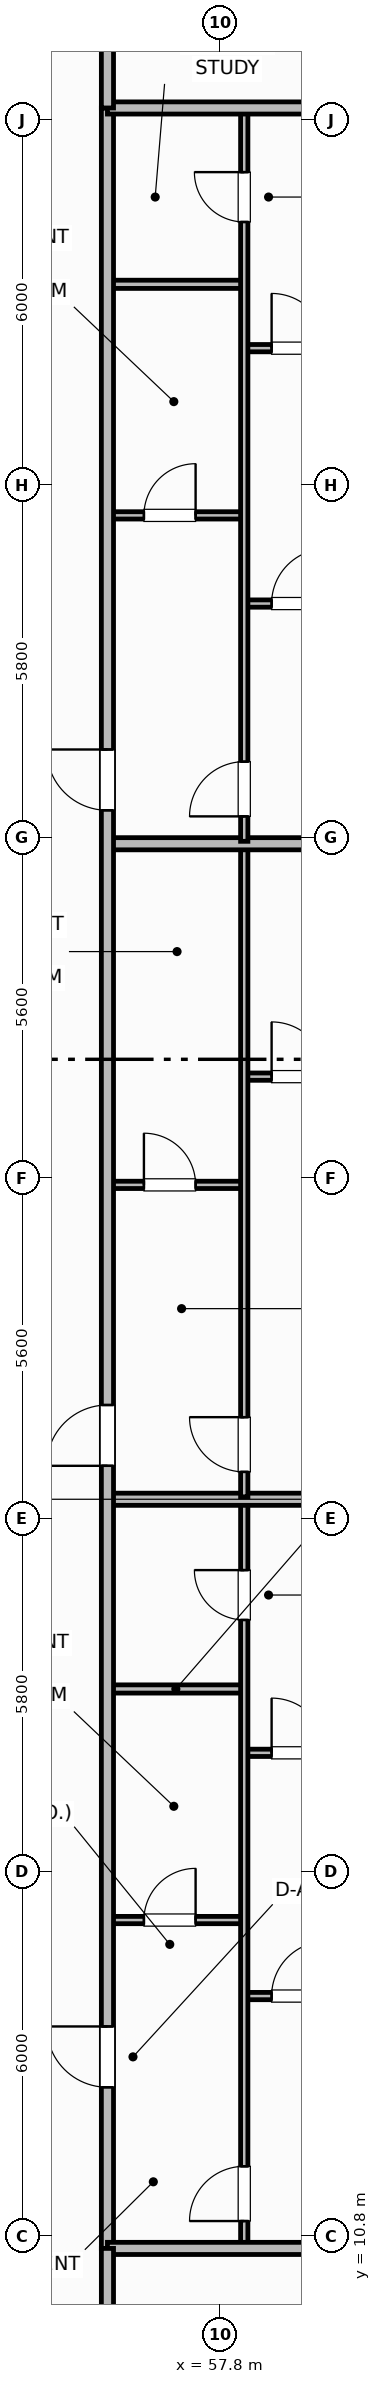
"""IFC4 building model, lengths in metres.
Left out: names, types, materials, properties, quantities, classifications, styles, units other than length and angle.
Written with IfcOpenShell. Run it as: python <this file> out.ifc"""

import sys

from ifc_helpers import new_model, si_unit, direction, frame, frame_2d, origin, place, context, subcontext, project, spatial, rectangle, extrude, element, fill, save


model = new_model("IFC4")
c1 = context("Model", 3, precision=1e-05, world=origin(), true_north=direction((0.0, 1.0)))
c2 = subcontext(c1, "Body", "Model", "MODEL_VIEW")
j1 = project(units=[si_unit("LENGTHUNIT", "METRE"), si_unit("PLANEANGLEUNIT", "RADIAN")], contexts=[c1])
p1 = place(None, origin())
s1 = spatial("IfcSite", under=j1, at=p1, CompositionType="ELEMENT")
p2 = place(p1, origin())
s2 = spatial("IfcBuilding", under=s1, at=p2, CompositionType="ELEMENT")
p3 = place(p2, frame((0.0, 0.0, 69.5)))
s3 = spatial("IfcBuildingStorey", under=s2, at=p3, CompositionType="ELEMENT", Elevation=69.5)
p4 = place(p3, frame((55.95, 16.0, 0.0), z_axis=(0.0, 0.0, 1.0), x_axis=(1.0, 0.0, 0.0)))
e1 = element("IfcWall", 1, at=p4, inside=s3, PredefinedType="PARTITIONING", context=c2, shape_type="SweptSolid", body=[
    extrude(rectangle(XDim=2.25, YDim=0.12, at=frame_2d((1.125, 0.0))), origin(), (0.0, 0.0, 1.0), 2.53),
])
p5 = place(p4, frame((0.6, 0.0, 0.0)))
e2 = element("IfcOpeningElement", 2, at=p5, cuts=e1, PredefinedType="OPENING", context=c2, shape_type="SweptSolid", body=[
    extrude(rectangle(XDim=0.85, YDim=2.1, at=frame_2d((0.425, 1.05))), frame((0.0, 0.07, 0.0), z_axis=(0.0, -1.0, 0.0), x_axis=(1.0, 0.0, 0.0)), (0.0, 0.0, 1.0), 0.14),
])
p6 = place(p3, frame((55.95, 19.8, 0.0), z_axis=(0.0, 0.0, 1.0), x_axis=(1.0, 0.0, 0.0)))
e3 = element("IfcWall", 3, at=p6, inside=s3, PredefinedType="PARTITIONING", context=c2, shape_type="SweptSolid", body=[
    extrude(rectangle(XDim=2.25, YDim=0.135, at=frame_2d((1.125, 0.0))), origin(), (0.0, 0.0, 1.0), 2.53),
])
p7 = place(p3, frame((58.2, 14.75, 0.0), z_axis=(0.0, 0.0, 1.0), x_axis=(1.0, 0.0, 0.0)))
e4 = element("IfcWall", 4, at=p7, inside=s3, PredefinedType="PARTITIONING", context=c2, shape_type="SweptSolid", body=[
    extrude(rectangle(XDim=5.63, YDim=0.12, at=frame_2d((2.815, 0.0))), origin(), (0.0, 0.0, 1.0), 2.53),
])
p8 = place(p7, frame((0.45, 0.0, 0.0)))
e5 = element("IfcOpeningElement", 5, at=p8, cuts=e4, PredefinedType="OPENING", context=c2, shape_type="SweptSolid", body=[
    extrude(rectangle(XDim=0.9, YDim=2.1, at=frame_2d((0.45, 1.05))), frame((0.0, 0.07, 0.0), z_axis=(0.0, -1.0, 0.0), x_axis=(1.0, 0.0, 0.0)), (0.0, 0.0, 1.0), 0.14),
])
p9 = place(p3, frame((58.2, 18.75, 0.0), z_axis=(0.0, 0.0, 1.0), x_axis=(1.0, 0.0, 0.0)))
e6 = element("IfcWall", 6, at=p9, inside=s3, PredefinedType="PARTITIONING", context=c2, shape_type="SweptSolid", body=[
    extrude(rectangle(XDim=5.63, YDim=0.12, at=frame_2d((2.815, 0.0))), origin(), (0.0, 0.0, 1.0), 2.53),
])
p10 = place(p9, frame((0.45, 0.0, 0.0)))
e7 = element("IfcOpeningElement", 7, at=p10, cuts=e6, PredefinedType="OPENING", context=c2, shape_type="SweptSolid", body=[
    extrude(rectangle(XDim=0.9, YDim=2.1, at=frame_2d((0.45, 1.05))), frame((0.0, 0.07, 0.0), z_axis=(0.0, -1.0, 0.0), x_axis=(1.0, 0.0, 0.0)), (0.0, 0.0, 1.0), 0.14),
])
p11 = place(p3, frame((58.2, 10.64, 0.0), z_axis=(0.0, 0.0, 1.0), x_axis=(0.0, 1.0, 0.0)))
e8 = element("IfcWall", 8, at=p11, inside=s3, PredefinedType="PARTITIONING", context=c2, shape_type="SweptSolid", body=[
    extrude(rectangle(XDim=12.24, YDim=0.12, at=frame_2d((6.12, 0.0))), origin(), (0.0, 0.0, 1.0), 2.53),
])
p12 = place(p11, frame((0.41, 0.0, 0.0)))
e9 = element("IfcOpeningElement", 9, at=p12, cuts=e8, PredefinedType="OPENING", context=c2, shape_type="SweptSolid", body=[
    extrude(rectangle(XDim=0.9, YDim=2.1, at=frame_2d((0.45, 1.05))), frame((0.0, 0.07, 0.0), z_axis=(0.0, -1.0, 0.0), x_axis=(1.0, 0.0, 0.0)), (0.0, 0.0, 1.0), 0.14),
])
p13 = place(p11, frame((10.295, 0.0, 0.0)))
e10 = element("IfcOpeningElement", 10, at=p13, cuts=e8, PredefinedType="OPENING", context=c2, shape_type="SweptSolid", body=[
    extrude(rectangle(XDim=0.82, YDim=2.08, at=frame_2d((0.41, 1.04))), frame((0.0, 0.07, 0.0), z_axis=(0.0, -1.0, 0.0), x_axis=(1.0, 0.0, 0.0)), (0.0, 0.0, 1.0), 0.14),
])
p14 = place(p3, frame((55.95, 22.92, 0.0), z_axis=(0.0, 0.0, 1.0), x_axis=(1.0, 0.0, 0.0)))
e11 = element("IfcWall", 11, at=p14, inside=s3, PredefinedType="PARTITIONING", context=c2, shape_type="SweptSolid", body=[
    extrude(rectangle(XDim=7.88, YDim=0.2, at=frame_2d((3.94, 0.0))), origin(), (0.0, 0.0, 1.0), 2.53),
])
p15 = place(p3, frame((55.95, 28.09, 0.0), z_axis=(0.0, 0.0, 1.0), x_axis=(1.0, 0.0, 0.0)))
e12 = element("IfcWall", 12, at=p15, inside=s3, PredefinedType="PARTITIONING", context=c2, shape_type="SweptSolid", body=[
    extrude(rectangle(XDim=2.25, YDim=0.12, at=frame_2d((1.125, 0.0))), origin(), (0.0, 0.0, 1.0), 2.53),
])
p16 = place(p15, frame((0.6, 0.0, 0.0)))
e13 = element("IfcOpeningElement", 13, at=p16, cuts=e12, PredefinedType="OPENING", context=c2, shape_type="SweptSolid", body=[
    extrude(rectangle(XDim=0.85, YDim=2.1, at=frame_2d((0.425, 1.05))), frame((0.0, 0.07, 0.0), z_axis=(0.0, -1.0, 0.0), x_axis=(1.0, 0.0, 0.0)), (0.0, 0.0, 1.0), 0.14),
])
p17 = place(p3, frame((58.2, 29.87, 0.0), z_axis=(0.0, 0.0, 1.0), x_axis=(1.0, 0.0, 0.0)))
e14 = element("IfcWall", 14, at=p17, inside=s3, PredefinedType="PARTITIONING", context=c2, shape_type="SweptSolid", body=[
    extrude(rectangle(XDim=4.947, YDim=0.12, at=frame_2d((2.473, 0.0))), origin(), (0.0, 0.0, 1.0), 2.53),
])
p18 = place(p17, frame((0.45, 0.0, 0.0)))
e15 = element("IfcOpeningElement", 15, at=p18, cuts=e14, PredefinedType="OPENING", context=c2, shape_type="SweptSolid", body=[
    extrude(rectangle(XDim=0.9, YDim=2.1, at=frame_2d((0.45, 1.05))), frame((0.0, 0.07, 0.0), z_axis=(0.0, -1.0, 0.0), x_axis=(1.0, 0.0, 0.0)), (0.0, 0.0, 1.0), 0.14),
])
p19 = place(p3, frame((58.2, 22.96, 0.0), z_axis=(0.0, 0.0, 1.0), x_axis=(0.0, 1.0, 0.0)))
e16 = element("IfcWall", 16, at=p19, inside=s3, PredefinedType="PARTITIONING", context=c2, shape_type="SweptSolid", body=[
    extrude(rectangle(XDim=10.7, YDim=0.12, at=frame_2d((5.35, 0.0))), origin(), (0.0, 0.0, 1.0), 2.53),
])
p20 = place(p19, frame((0.41, 0.0, 0.0)))
e17 = element("IfcOpeningElement", 17, at=p20, cuts=e16, PredefinedType="OPENING", context=c2, shape_type="SweptSolid", body=[
    extrude(rectangle(XDim=0.9, YDim=2.1, at=frame_2d((0.45, 1.05))), frame((0.0, 0.07, 0.0), z_axis=(0.0, -1.0, 0.0), x_axis=(1.0, 0.0, 0.0)), (0.0, 0.0, 1.0), 0.14),
])
p21 = place(p3, frame((55.95, 33.7, 0.0), z_axis=(0.0, 0.0, 1.0), x_axis=(1.0, 0.0, 0.0)))
e18 = element("IfcWall", 18, at=p21, inside=s3, PredefinedType="PARTITIONING", context=c2, shape_type="SweptSolid", body=[
    extrude(rectangle(XDim=7.88, YDim=0.2, at=frame_2d((3.94, 0.0))), origin(), (0.0, 0.0, 1.0), 2.53),
])
p22 = place(p3, frame((55.95, 39.1, 0.0), z_axis=(0.0, 0.0, 1.0), x_axis=(1.0, 0.0, 0.0)))
e19 = element("IfcWall", 19, at=p22, inside=s3, PredefinedType="PARTITIONING", context=c2, shape_type="SweptSolid", body=[
    extrude(rectangle(XDim=2.25, YDim=0.12, at=frame_2d((1.125, 0.0))), origin(), (0.0, 0.0, 1.0), 2.53),
])
p23 = place(p22, frame((0.6, 0.0, 0.0)))
e20 = element("IfcOpeningElement", 20, at=p23, cuts=e19, PredefinedType="OPENING", context=c2, shape_type="SweptSolid", body=[
    extrude(rectangle(XDim=0.85, YDim=2.1, at=frame_2d((0.425, 1.05))), frame((0.0, 0.07, 0.0), z_axis=(0.0, -1.0, 0.0), x_axis=(1.0, 0.0, 0.0)), (0.0, 0.0, 1.0), 0.14),
])
p24 = place(p3, frame((55.95, 42.9, 0.0), z_axis=(0.0, 0.0, 1.0), x_axis=(1.0, 0.0, 0.0)))
e21 = element("IfcWall", 21, at=p24, inside=s3, PredefinedType="PARTITIONING", context=c2, shape_type="SweptSolid", body=[
    extrude(rectangle(XDim=2.25, YDim=0.135, at=frame_2d((1.125, 0.0))), origin(), (0.0, 0.0, 1.0), 2.53),
])
p25 = place(p3, frame((58.2, 37.65, 0.0), z_axis=(0.0, 0.0, 1.0), x_axis=(1.0, 0.0, 0.0)))
e22 = element("IfcWall", 22, at=p25, inside=s3, PredefinedType="PARTITIONING", context=c2, shape_type="SweptSolid", body=[
    extrude(rectangle(XDim=5.63, YDim=0.12, at=frame_2d((2.815, 0.0))), origin(), (0.0, 0.0, 1.0), 2.53),
])
p26 = place(p25, frame((0.45, 0.0, 0.0)))
e23 = element("IfcOpeningElement", 23, at=p26, cuts=e22, PredefinedType="OPENING", context=c2, shape_type="SweptSolid", body=[
    extrude(rectangle(XDim=0.9, YDim=2.1, at=frame_2d((0.45, 1.05))), frame((0.0, 0.07, 0.0), z_axis=(0.0, -1.0, 0.0), x_axis=(1.0, 0.0, 0.0)), (0.0, 0.0, 1.0), 0.14),
])
p27 = place(p3, frame((58.2, 41.85, 0.0), z_axis=(0.0, 0.0, 1.0), x_axis=(1.0, 0.0, 0.0)))
e24 = element("IfcWall", 24, at=p27, inside=s3, PredefinedType="PARTITIONING", context=c2, shape_type="SweptSolid", body=[
    extrude(rectangle(XDim=5.63, YDim=0.12, at=frame_2d((2.815, 0.0))), origin(), (0.0, 0.0, 1.0), 2.53),
])
p28 = place(p27, frame((0.45, 0.0, 0.0)))
e25 = element("IfcOpeningElement", 25, at=p28, cuts=e24, PredefinedType="OPENING", context=c2, shape_type="SweptSolid", body=[
    extrude(rectangle(XDim=0.9, YDim=2.1, at=frame_2d((0.45, 1.05))), frame((0.0, 0.07, 0.0), z_axis=(0.0, -1.0, 0.0), x_axis=(1.0, 0.0, 0.0)), (0.0, 0.0, 1.0), 0.14),
])
p29 = place(p3, frame((58.2, 33.74, 0.0), z_axis=(0.0, 0.0, 1.0), x_axis=(0.0, 1.0, 0.0)))
e26 = element("IfcWall", 26, at=p29, inside=s3, PredefinedType="PARTITIONING", context=c2, shape_type="SweptSolid", body=[
    extrude(rectangle(XDim=12.02, YDim=0.12, at=frame_2d((6.01, 0.0))), origin(), (0.0, 0.0, 1.0), 2.53),
])
p30 = place(p29, frame((0.41, 0.0, 0.0)))
e27 = element("IfcOpeningElement", 27, at=p30, cuts=e26, PredefinedType="OPENING", context=c2, shape_type="SweptSolid", body=[
    extrude(rectangle(XDim=0.9, YDim=2.1, at=frame_2d((0.45, 1.05))), frame((0.0, 0.07, 0.0), z_axis=(0.0, -1.0, 0.0), x_axis=(1.0, 0.0, 0.0)), (0.0, 0.0, 1.0), 0.14),
])
p31 = place(p29, frame((10.185, 0.0, 0.0)))
e28 = element("IfcOpeningElement", 28, at=p31, cuts=e26, PredefinedType="OPENING", context=c2, shape_type="SweptSolid", body=[
    extrude(rectangle(XDim=0.82, YDim=2.08, at=frame_2d((0.41, 1.04))), frame((0.0, 0.07, 0.0), z_axis=(0.0, -1.0, 0.0), x_axis=(1.0, 0.0, 0.0)), (0.0, 0.0, 1.0), 0.14),
])
p32 = place(p3, frame((55.95, 10.6, 0.0), z_axis=(0.0, 0.0, 1.0), x_axis=(0.0, 1.0, 0.0)))
e29 = element("IfcWall", 29, at=p32, inside=s3, PredefinedType="PARTITIONING", context=c2, shape_type="SweptSolid", body=[
    extrude(rectangle(XDim=35.2, YDim=0.2, at=frame_2d((17.6, 0.0))), origin(), (0.0, 0.0, 1.0), 2.53),
])
p33 = place(p32, frame((2.65, 0.0, 0.0)))
e30 = element("IfcOpeningElement", 30, at=p33, cuts=e29, PredefinedType="OPENING", context=c2, shape_type="SweptSolid", body=[
    extrude(rectangle(XDim=1.0, YDim=2.15, at=frame_2d((0.5, 1.075))), frame((0.0, 0.11, 0.0), z_axis=(0.0, -1.0, 0.0), x_axis=(1.0, 0.0, 0.0)), (0.0, 0.0, 1.0), 0.22),
])
p34 = place(p32, frame((12.87, 0.0, 0.0)))
e31 = element("IfcOpeningElement", 31, at=p34, cuts=e29, PredefinedType="OPENING", context=c2, shape_type="SweptSolid", body=[
    extrude(rectangle(XDim=1.0, YDim=2.15, at=frame_2d((0.5, 1.075))), frame((0.0, 0.11, 0.0), z_axis=(0.0, -1.0, 0.0), x_axis=(1.0, 0.0, 0.0)), (0.0, 0.0, 1.0), 0.22),
])
p35 = place(p32, frame((23.65, 0.0, 0.0)))
e32 = element("IfcOpeningElement", 32, at=p35, cuts=e29, PredefinedType="OPENING", context=c2, shape_type="SweptSolid", body=[
    extrude(rectangle(XDim=1.0, YDim=2.15, at=frame_2d((0.5, 1.075))), frame((0.0, 0.11, 0.0), z_axis=(0.0, -1.0, 0.0), x_axis=(1.0, 0.0, 0.0)), (0.0, 0.0, 1.0), 0.22),
])
for number, where, z_axis, x_axis in (
    (33, (55.95, 10.6, 0.0), (0.0, 0.0, 1.0), (1.0, 0.0, 0.0)),
    (34, (55.95, 45.8, 0.0), (0.0, 0.0, 1.0), (1.0, 0.0, 0.0)),
):
    element("IfcWall", number, at=place(p3, frame(where, z_axis=z_axis, x_axis=x_axis)), inside=s3, PredefinedType="PARTITIONING", context=c2, shape_type="SweptSolid", body=[
        extrude(rectangle(XDim=7.46, YDim=0.2, at=frame_2d((3.73, 0.0))), origin(), (0.0, 0.0, 1.0), 2.53),
    ])
p36 = place(p3, frame((55.95, 4.97, 0.0), z_axis=(0.0, 0.0, 1.0), x_axis=(0.0, 1.0, 0.0)))
e35 = element("IfcWall", 35, at=p36, inside=s3, PredefinedType="PARTITIONING", context=c2, shape_type="SweptSolid", body=[
    extrude(rectangle(XDim=5.63, YDim=0.2, at=frame_2d((2.815, 0.0))), origin(), (0.0, 0.0, 1.0), 2.53),
])
p37 = place(p3, frame((55.95, 45.8, 0.0), z_axis=(0.0, 0.0, 1.0), x_axis=(0.0, 1.0, 0.0)))
e36 = element("IfcWall", 36, at=p37, inside=s3, PredefinedType="PARTITIONING", context=c2, shape_type="SweptSolid", body=[
    extrude(rectangle(XDim=5.63, YDim=0.2, at=frame_2d((2.815, 0.0))), origin(), (0.0, 0.0, 1.0), 2.53),
])
p38 = place(p5, origin())
e37 = element("IfcDoor", 37, at=p38, inside=s3, OperationType="SINGLE_SWING_RIGHT", PredefinedType="DOOR", context=c2, shape_type="SweptSolid", body=[
    extrude(rectangle(XDim=0.85, YDim=2.1, at=frame_2d((0.425, 1.05))), frame((0.0, 0.025, 0.0), z_axis=(0.0, -1.0, 0.0), x_axis=(1.0, 0.0, 0.0)), (0.0, 0.0, 1.0), 0.05),
])
fill(e2, e37)
p39 = place(p8, origin())
e38 = element("IfcDoor", 38, at=p39, inside=s3, OperationType="SINGLE_SWING_RIGHT", PredefinedType="DOOR", context=c2, shape_type="SweptSolid", body=[
    extrude(rectangle(XDim=0.9, YDim=2.1, at=frame_2d((0.45, 1.05))), frame((0.0, 0.025, 0.0), z_axis=(0.0, -1.0, 0.0), x_axis=(1.0, 0.0, 0.0)), (0.0, 0.0, 1.0), 0.05),
])
fill(e5, e38)
p40 = place(p10, origin())
e39 = element("IfcDoor", 39, at=p40, inside=s3, OperationType="SINGLE_SWING_LEFT", PredefinedType="DOOR", context=c2, shape_type="SweptSolid", body=[
    extrude(rectangle(XDim=0.9, YDim=2.1, at=frame_2d((0.45, 1.05))), frame((0.0, 0.025, 0.0), z_axis=(0.0, -1.0, 0.0), x_axis=(1.0, 0.0, 0.0)), (0.0, 0.0, 1.0), 0.05),
])
fill(e7, e39)
p41 = place(p12, origin())
e40 = element("IfcDoor", 40, at=p41, inside=s3, OperationType="SINGLE_SWING_LEFT", PredefinedType="DOOR", context=c2, shape_type="SweptSolid", body=[
    extrude(rectangle(XDim=0.9, YDim=2.1, at=frame_2d((0.45, 1.05))), frame((0.0, 0.025, 0.0), z_axis=(0.0, -1.0, 0.0), x_axis=(1.0, 0.0, 0.0)), (0.0, 0.0, 1.0), 0.05),
])
fill(e9, e40)
p42 = place(p13, origin())
e41 = element("IfcDoor", 41, at=p42, inside=s3, OperationType="SINGLE_SWING_RIGHT", PredefinedType="DOOR", context=c2, shape_type="SweptSolid", body=[
    extrude(rectangle(XDim=0.82, YDim=2.08, at=frame_2d((0.41, 1.04))), frame((0.0, 0.025, 0.0), z_axis=(0.0, -1.0, 0.0), x_axis=(1.0, 0.0, 0.0)), (0.0, 0.0, 1.0), 0.05),
])
fill(e10, e41)
p43 = place(p16, origin())
e42 = element("IfcDoor", 42, at=p43, inside=s3, OperationType="SINGLE_SWING_LEFT", PredefinedType="DOOR", context=c2, shape_type="SweptSolid", body=[
    extrude(rectangle(XDim=0.85, YDim=2.1, at=frame_2d((0.425, 1.05))), frame((0.0, 0.025, 0.0), z_axis=(0.0, -1.0, 0.0), x_axis=(1.0, 0.0, 0.0)), (0.0, 0.0, 1.0), 0.05),
])
fill(e13, e42)
p44 = place(p18, origin())
e43 = element("IfcDoor", 43, at=p44, inside=s3, OperationType="SINGLE_SWING_LEFT", PredefinedType="DOOR", context=c2, shape_type="SweptSolid", body=[
    extrude(rectangle(XDim=0.9, YDim=2.1, at=frame_2d((0.45, 1.05))), frame((0.0, 0.025, 0.0), z_axis=(0.0, -1.0, 0.0), x_axis=(1.0, 0.0, 0.0)), (0.0, 0.0, 1.0), 0.05),
])
fill(e15, e43)
p45 = place(p20, origin())
e44 = element("IfcDoor", 44, at=p45, inside=s3, OperationType="SINGLE_SWING_RIGHT", PredefinedType="DOOR", context=c2, shape_type="SweptSolid", body=[
    extrude(rectangle(XDim=0.9, YDim=2.1, at=frame_2d((0.45, 1.05))), frame((0.0, 0.025, 0.0), z_axis=(0.0, -1.0, 0.0), x_axis=(1.0, 0.0, 0.0)), (0.0, 0.0, 1.0), 0.05),
])
fill(e17, e44)
p46 = place(p23, origin())
e45 = element("IfcDoor", 45, at=p46, inside=s3, OperationType="SINGLE_SWING_RIGHT", PredefinedType="DOOR", context=c2, shape_type="SweptSolid", body=[
    extrude(rectangle(XDim=0.85, YDim=2.1, at=frame_2d((0.425, 1.05))), frame((0.0, 0.025, 0.0), z_axis=(0.0, -1.0, 0.0), x_axis=(1.0, 0.0, 0.0)), (0.0, 0.0, 1.0), 0.05),
])
fill(e20, e45)
p47 = place(p26, origin())
e46 = element("IfcDoor", 46, at=p47, inside=s3, OperationType="SINGLE_SWING_RIGHT", PredefinedType="DOOR", context=c2, shape_type="SweptSolid", body=[
    extrude(rectangle(XDim=0.9, YDim=2.1, at=frame_2d((0.45, 1.05))), frame((0.0, 0.025, 0.0), z_axis=(0.0, -1.0, 0.0), x_axis=(1.0, 0.0, 0.0)), (0.0, 0.0, 1.0), 0.05),
])
fill(e23, e46)
p48 = place(p28, origin())
e47 = element("IfcDoor", 47, at=p48, inside=s3, OperationType="SINGLE_SWING_LEFT", PredefinedType="DOOR", context=c2, shape_type="SweptSolid", body=[
    extrude(rectangle(XDim=0.9, YDim=2.1, at=frame_2d((0.45, 1.05))), frame((0.0, 0.025, 0.0), z_axis=(0.0, -1.0, 0.0), x_axis=(1.0, 0.0, 0.0)), (0.0, 0.0, 1.0), 0.05),
])
fill(e25, e47)
p49 = place(p30, origin())
e48 = element("IfcDoor", 48, at=p49, inside=s3, OperationType="SINGLE_SWING_LEFT", PredefinedType="DOOR", context=c2, shape_type="SweptSolid", body=[
    extrude(rectangle(XDim=0.9, YDim=2.1, at=frame_2d((0.45, 1.05))), frame((0.0, 0.025, 0.0), z_axis=(0.0, -1.0, 0.0), x_axis=(1.0, 0.0, 0.0)), (0.0, 0.0, 1.0), 0.05),
])
fill(e27, e48)
p50 = place(p31, origin())
e49 = element("IfcDoor", 49, at=p50, inside=s3, OperationType="SINGLE_SWING_RIGHT", PredefinedType="DOOR", context=c2, shape_type="SweptSolid", body=[
    extrude(rectangle(XDim=0.82, YDim=2.08, at=frame_2d((0.41, 1.04))), frame((0.0, 0.025, 0.0), z_axis=(0.0, -1.0, 0.0), x_axis=(1.0, 0.0, 0.0)), (0.0, 0.0, 1.0), 0.05),
])
fill(e28, e49)
p51 = place(p33, origin())
e50 = element("IfcDoor", 50, at=p51, inside=s3, OperationType="SINGLE_SWING_RIGHT", PredefinedType="DOOR", context=c2, shape_type="SweptSolid", body=[
    extrude(rectangle(XDim=1.0, YDim=2.15, at=frame_2d((0.5, 1.075))), frame((0.0, 0.025, 0.0), z_axis=(0.0, -1.0, 0.0), x_axis=(1.0, 0.0, 0.0)), (0.0, 0.0, 1.0), 0.05),
])
fill(e30, e50)
p52 = place(p34, origin())
e51 = element("IfcDoor", 51, at=p52, inside=s3, OperationType="SINGLE_SWING_LEFT", PredefinedType="DOOR", context=c2, shape_type="SweptSolid", body=[
    extrude(rectangle(XDim=1.0, YDim=2.15, at=frame_2d((0.5, 1.075))), frame((0.0, 0.025, 0.0), z_axis=(0.0, -1.0, 0.0), x_axis=(1.0, 0.0, 0.0)), (0.0, 0.0, 1.0), 0.05),
])
fill(e31, e51)
p53 = place(p35, origin())
e52 = element("IfcDoor", 52, at=p53, inside=s3, OperationType="SINGLE_SWING_RIGHT", PredefinedType="DOOR", context=c2, shape_type="SweptSolid", body=[
    extrude(rectangle(XDim=1.0, YDim=2.15, at=frame_2d((0.5, 1.075))), frame((0.0, 0.025, 0.0), z_axis=(0.0, -1.0, 0.0), x_axis=(1.0, 0.0, 0.0)), (0.0, 0.0, 1.0), 0.05),
])
fill(e32, e52)
save(model, sys.argv[1])
